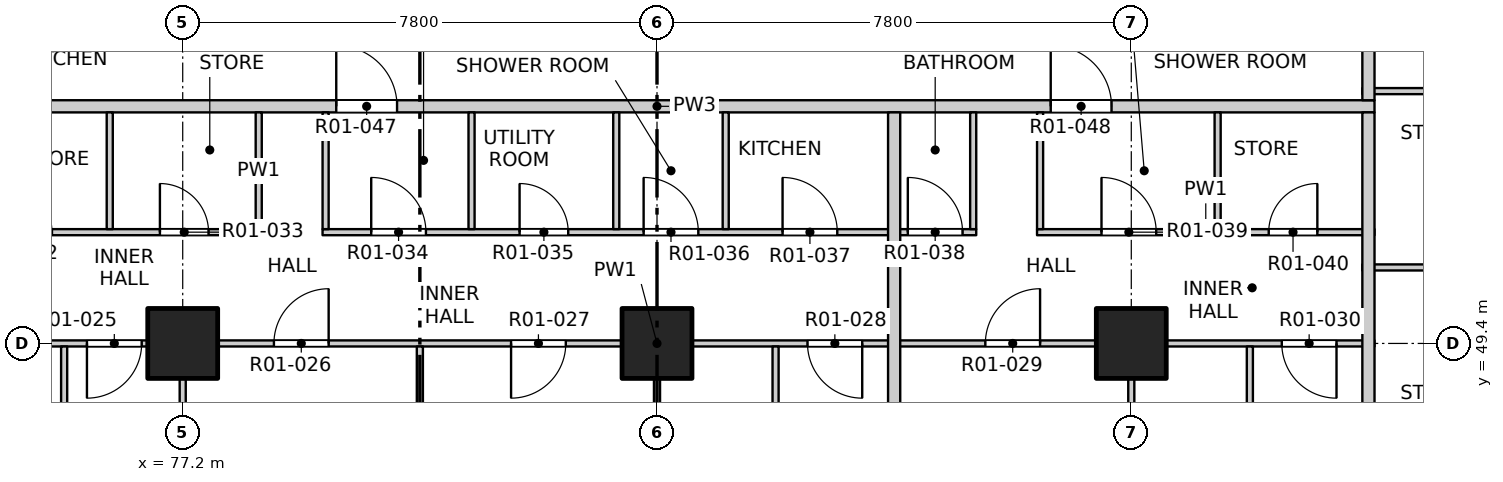
"""IFC4 building model, lengths in metres.
Left out: names, types, materials, properties, quantities, classifications, styles, units other than length and angle.
Written with IfcOpenShell. Run it as: python <this file> out.ifc"""

import sys

from ifc_helpers import new_model, si_unit, direction, frame, frame_2d, origin, origin_2d, place, context, subcontext, project, spatial, rectangle, extrude, element, fill, save


model = new_model("IFC4")
c1 = context("Model", 3, precision=1e-05, world=origin(), true_north=direction((0.0, 1.0)))
c2 = subcontext(c1, "Body", "Model", "MODEL_VIEW")
j1 = project(units=[si_unit("LENGTHUNIT", "METRE"), si_unit("PLANEANGLEUNIT", "RADIAN")], contexts=[c1])
p1 = place(None, origin())
s1 = spatial("IfcSite", under=j1, at=p1, CompositionType="ELEMENT")
p2 = place(p1, origin())
s2 = spatial("IfcBuilding", under=s1, at=p2, CompositionType="ELEMENT")
p3 = place(p2, frame((0.0, 0.0, 26.3)))
s3 = spatial("IfcBuildingStorey", under=s2, at=p3, CompositionType="ELEMENT", Elevation=26.3)
for number, where, z_axis, x_axis in (
    (1, (77.2, 49.4, -0.25), (0.0, 0.0, 1.0), (1.0, 0.0, 0.0)),
    (2, (85.0, 49.4, -0.25), (0.0, 0.0, 1.0), (1.0, 0.0, 0.0)),
    (3, (92.8, 49.4, -0.25), (0.0, 0.0, 1.0), (1.0, 0.0, 0.0)),
):
    element("IfcColumn", number, at=place(p3, frame(where, z_axis=z_axis, x_axis=x_axis)), inside=s3, PredefinedType="COLUMN", context=c2, shape_type="SweptSolid", body=[
        extrude(rectangle(XDim=1.15, YDim=1.15, at=origin_2d()), origin(), (0.0, 0.0, 1.0), 3.4),
    ])
p4 = place(p3, frame((73.2, 49.4, 0.0), z_axis=(0.0, 0.0, 1.0), x_axis=(1.0, 0.0, 0.0)))
e4 = element("IfcWall", 4, at=p4, inside=s3, PredefinedType="PARTITIONING", context=c2, shape_type="SweptSolid", body=[
    extrude(rectangle(XDim=23.6, YDim=0.1, at=frame_2d((11.8, 0.0))), origin(), (0.0, 0.0, 1.0), 3.15),
])
p5 = place(p4, frame((2.425, 0.0, 0.0)))
e5 = element("IfcOpeningElement", 5, at=p5, cuts=e4, PredefinedType="OPENING", context=c2, shape_type="SweptSolid", body=[
    extrude(rectangle(XDim=0.9, YDim=2.1, at=frame_2d((0.45, 1.05))), frame((0.0, 0.06, 0.0), z_axis=(0.0, -1.0, 0.0), x_axis=(1.0, 0.0, 0.0)), (0.0, 0.0, 1.0), 0.12),
])
p6 = place(p4, frame((5.5, 0.0, 0.0)))
e6 = element("IfcOpeningElement", 6, at=p6, cuts=e4, PredefinedType="OPENING", context=c2, shape_type="SweptSolid", body=[
    extrude(rectangle(XDim=0.9, YDim=2.1, at=frame_2d((0.45, 1.05))), frame((0.0, 0.06, 0.0), z_axis=(0.0, -1.0, 0.0), x_axis=(1.0, 0.0, 0.0)), (0.0, 0.0, 1.0), 0.12),
])
p7 = place(p4, frame((9.4, 0.0, 0.0)))
e7 = element("IfcOpeningElement", 7, at=p7, cuts=e4, PredefinedType="OPENING", context=c2, shape_type="SweptSolid", body=[
    extrude(rectangle(XDim=0.9, YDim=2.1, at=frame_2d((0.45, 1.05))), frame((0.0, 0.06, 0.0), z_axis=(0.0, -1.0, 0.0), x_axis=(1.0, 0.0, 0.0)), (0.0, 0.0, 1.0), 0.12),
])
p8 = place(p4, frame((14.275, 0.0, 0.0)))
e8 = element("IfcOpeningElement", 8, at=p8, cuts=e4, PredefinedType="OPENING", context=c2, shape_type="SweptSolid", body=[
    extrude(rectangle(XDim=0.9, YDim=2.1, at=frame_2d((0.45, 1.05))), frame((0.0, 0.06, 0.0), z_axis=(0.0, -1.0, 0.0), x_axis=(1.0, 0.0, 0.0)), (0.0, 0.0, 1.0), 0.12),
])
p9 = place(p4, frame((17.2, 0.0, 0.0)))
e9 = element("IfcOpeningElement", 9, at=p9, cuts=e4, PredefinedType="OPENING", context=c2, shape_type="SweptSolid", body=[
    extrude(rectangle(XDim=0.9, YDim=2.1, at=frame_2d((0.45, 1.05))), frame((0.0, 0.06, 0.0), z_axis=(0.0, -1.0, 0.0), x_axis=(1.0, 0.0, 0.0)), (0.0, 0.0, 1.0), 0.12),
])
p10 = place(p4, frame((22.075, 0.0, 0.0)))
e10 = element("IfcOpeningElement", 10, at=p10, cuts=e4, PredefinedType="OPENING", context=c2, shape_type="SweptSolid", body=[
    extrude(rectangle(XDim=0.9, YDim=2.1, at=frame_2d((0.45, 1.05))), frame((0.0, 0.06, 0.0), z_axis=(0.0, -1.0, 0.0), x_axis=(1.0, 0.0, 0.0)), (0.0, 0.0, 1.0), 0.12),
])
p11 = place(p3, frame((96.6, 50.65, 0.0), z_axis=(0.0, 0.0, 1.0), x_axis=(1.0, 0.0, 0.0)))
e11 = element("IfcWall", 11, at=p11, inside=s3, PredefinedType="PARTITIONING", context=c2, shape_type="SweptSolid", body=[
    extrude(rectangle(XDim=2.22, YDim=0.1, at=frame_2d((1.11, 0.0))), origin(), (0.0, 0.0, 1.0), 3.15),
])
p12 = place(p3, frame((73.2, 51.23, 0.0), z_axis=(0.0, 0.0, 1.0), x_axis=(1.0, 0.0, 0.0)))
e12 = element("IfcWall", 12, at=p12, inside=s3, PredefinedType="PARTITIONING", context=c2, shape_type="SweptSolid", body=[
    extrude(rectangle(XDim=5.3, YDim=0.1, at=frame_2d((2.65, 0.0))), origin(), (0.0, 0.0, 1.0), 3.15),
])
p13 = place(p12, frame((1.05, 0.0, 0.0)))
e13 = element("IfcOpeningElement", 13, at=p13, cuts=e12, PredefinedType="OPENING", context=c2, shape_type="SweptSolid", body=[
    extrude(rectangle(XDim=0.8, YDim=2.1, at=frame_2d((0.4, 1.05))), frame((0.0, 0.06, 0.0), z_axis=(0.0, -1.0, 0.0), x_axis=(1.0, 0.0, 0.0)), (0.0, 0.0, 1.0), 0.12),
])
p14 = place(p12, frame((3.625, 0.0, 0.0)))
e14 = element("IfcOpeningElement", 14, at=p14, cuts=e12, PredefinedType="OPENING", context=c2, shape_type="SweptSolid", body=[
    extrude(rectangle(XDim=0.8, YDim=2.1, at=frame_2d((0.4, 1.05))), frame((0.0, 0.06, 0.0), z_axis=(0.0, -1.0, 0.0), x_axis=(1.0, 0.0, 0.0)), (0.0, 0.0, 1.0), 0.12),
])
p15 = place(p3, frame((79.5, 51.23, 0.0), z_axis=(0.0, 0.0, 1.0), x_axis=(1.0, 0.0, 0.0)))
e15 = element("IfcWall", 15, at=p15, inside=s3, PredefinedType="PARTITIONING", context=c2, shape_type="SweptSolid", body=[
    extrude(rectangle(XDim=10.75, YDim=0.1, at=frame_2d((5.375, 0.0))), origin(), (0.0, 0.0, 1.0), 3.15),
])
p16 = place(p15, frame((0.8, 0.0, 0.0)))
e16 = element("IfcOpeningElement", 16, at=p16, cuts=e15, PredefinedType="OPENING", context=c2, shape_type="SweptSolid", body=[
    extrude(rectangle(XDim=0.9, YDim=2.1, at=frame_2d((0.45, 1.05))), frame((0.0, 0.06, 0.0), z_axis=(0.0, -1.0, 0.0), x_axis=(1.0, 0.0, 0.0)), (0.0, 0.0, 1.0), 0.12),
])
p17 = place(p15, frame((3.24, 0.0, 0.0)))
e17 = element("IfcOpeningElement", 17, at=p17, cuts=e15, PredefinedType="OPENING", context=c2, shape_type="SweptSolid", body=[
    extrude(rectangle(XDim=0.8, YDim=2.1, at=frame_2d((0.4, 1.05))), frame((0.0, 0.06, 0.0), z_axis=(0.0, -1.0, 0.0), x_axis=(1.0, 0.0, 0.0)), (0.0, 0.0, 1.0), 0.12),
])
p18 = place(p15, frame((5.28, 0.0, 0.0)))
e18 = element("IfcOpeningElement", 18, at=p18, cuts=e15, PredefinedType="OPENING", context=c2, shape_type="SweptSolid", body=[
    extrude(rectangle(XDim=0.9, YDim=2.1, at=frame_2d((0.45, 1.05))), frame((0.0, 0.06, 0.0), z_axis=(0.0, -1.0, 0.0), x_axis=(1.0, 0.0, 0.0)), (0.0, 0.0, 1.0), 0.12),
])
p19 = place(p15, frame((7.565, 0.0, 0.0)))
e19 = element("IfcOpeningElement", 19, at=p19, cuts=e15, PredefinedType="OPENING", context=c2, shape_type="SweptSolid", body=[
    extrude(rectangle(XDim=0.9, YDim=2.1, at=frame_2d((0.45, 1.05))), frame((0.0, 0.06, 0.0), z_axis=(0.0, -1.0, 0.0), x_axis=(1.0, 0.0, 0.0)), (0.0, 0.0, 1.0), 0.12),
])
p20 = place(p15, frame((9.625, 0.0, 0.0)))
e20 = element("IfcOpeningElement", 20, at=p20, cuts=e15, PredefinedType="OPENING", context=c2, shape_type="SweptSolid", body=[
    extrude(rectangle(XDim=0.9, YDim=2.1, at=frame_2d((0.45, 1.05))), frame((0.0, 0.06, 0.0), z_axis=(0.0, -1.0, 0.0), x_axis=(1.0, 0.0, 0.0)), (0.0, 0.0, 1.0), 0.12),
])
p21 = place(p3, frame((91.25, 51.23, 0.0), z_axis=(0.0, 0.0, 1.0), x_axis=(1.0, 0.0, 0.0)))
e21 = element("IfcWall", 21, at=p21, inside=s3, PredefinedType="PARTITIONING", context=c2, shape_type="SweptSolid", body=[
    extrude(rectangle(XDim=5.55, YDim=0.1, at=frame_2d((2.775, 0.0))), origin(), (0.0, 0.0, 1.0), 3.15),
])
p22 = place(p21, frame((1.06, 0.0, 0.0)))
e22 = element("IfcOpeningElement", 22, at=p22, cuts=e21, PredefinedType="OPENING", context=c2, shape_type="SweptSolid", body=[
    extrude(rectangle(XDim=0.9, YDim=2.1, at=frame_2d((0.45, 1.05))), frame((0.0, 0.06, 0.0), z_axis=(0.0, -1.0, 0.0), x_axis=(1.0, 0.0, 0.0)), (0.0, 0.0, 1.0), 0.12),
])
p23 = place(p21, frame((3.81, 0.0, 0.0)))
e23 = element("IfcOpeningElement", 23, at=p23, cuts=e21, PredefinedType="OPENING", context=c2, shape_type="SweptSolid", body=[
    extrude(rectangle(XDim=0.8, YDim=2.1, at=frame_2d((0.4, 1.05))), frame((0.0, 0.06, 0.0), z_axis=(0.0, -1.0, 0.0), x_axis=(1.0, 0.0, 0.0)), (0.0, 0.0, 1.0), 0.12),
])
p24 = place(p3, frame((73.2, 53.3, 0.0), z_axis=(0.0, 0.0, 1.0), x_axis=(1.0, 0.0, 0.0)))
e24 = element("IfcWall", 24, at=p24, inside=s3, PredefinedType="PARTITIONING", context=c2, shape_type="SweptSolid", body=[
    extrude(rectangle(XDim=23.6, YDim=0.2, at=frame_2d((11.8, 0.0))), origin(), (0.0, 0.0, 1.0), 3.15),
])
p25 = place(p24, frame((6.525, 0.0, 0.0)))
e25 = element("IfcOpeningElement", 25, at=p25, cuts=e24, PredefinedType="OPENING", context=c2, shape_type="SweptSolid", body=[
    extrude(rectangle(XDim=1.0, YDim=2.1, at=frame_2d((0.5, 1.05))), frame((0.0, 0.11, 0.0), z_axis=(0.0, -1.0, 0.0), x_axis=(1.0, 0.0, 0.0)), (0.0, 0.0, 1.0), 0.22),
])
p26 = place(p24, frame((18.275, 0.0, 0.0)))
e26 = element("IfcOpeningElement", 26, at=p26, cuts=e24, PredefinedType="OPENING", context=c2, shape_type="SweptSolid", body=[
    extrude(rectangle(XDim=1.0, YDim=2.1, at=frame_2d((0.5, 1.05))), frame((0.0, 0.11, 0.0), z_axis=(0.0, -1.0, 0.0), x_axis=(1.0, 0.0, 0.0)), (0.0, 0.0, 1.0), 0.22),
])
p27 = place(p3, frame((96.6, 53.55, 0.0), z_axis=(0.0, 0.0, 1.0), x_axis=(1.0, 0.0, 0.0)))
e27 = element("IfcWall", 27, at=p27, inside=s3, PredefinedType="PARTITIONING", context=c2, shape_type="SweptSolid", body=[
    extrude(rectangle(XDim=2.22, YDim=0.1, at=frame_2d((1.11, 0.0))), origin(), (0.0, 0.0, 1.0), 3.15),
])
p28 = place(p3, frame((75.25, 46.0, 0.0), z_axis=(0.0, 0.0, 1.0), x_axis=(0.0, 1.0, 0.0)))
e28 = element("IfcWall", 28, at=p28, inside=s3, PredefinedType="PARTITIONING", context=c2, shape_type="SweptSolid", body=[
    extrude(rectangle(XDim=3.35, YDim=0.1, at=frame_2d((1.675, 0.0))), origin(), (0.0, 0.0, 1.0), 3.15),
])
p29 = place(p3, frame((76.0, 51.28, 0.0), z_axis=(0.0, 0.0, 1.0), x_axis=(0.0, 1.0, 0.0)))
e29 = element("IfcWall", 29, at=p29, inside=s3, PredefinedType="PARTITIONING", context=c2, shape_type="SweptSolid", body=[
    extrude(rectangle(XDim=1.92, YDim=0.1, at=frame_2d((0.96, 0.0))), origin(), (0.0, 0.0, 1.0), 3.15),
])
p30 = place(p3, frame((77.2, 41.9, 0.0), z_axis=(0.0, 0.0, 1.0), x_axis=(0.0, 1.0, 0.0)))
e30 = element("IfcWall", 30, at=p30, inside=s3, PredefinedType="PARTITIONING", context=c2, shape_type="SweptSolid", body=[
    extrude(rectangle(XDim=7.45, YDim=0.1, at=frame_2d((3.725, 0.0))), origin(), (0.0, 0.0, 1.0), 2.55),
])
for number, where, z_axis, x_axis in (
    (31, (78.45, 51.28, 0.0), (0.0, 0.0, 1.0), (0.0, 1.0, 0.0)),
    (32, (79.55, 51.28, 0.0), (0.0, 0.0, 1.0), (0.0, 1.0, 0.0)),
):
    element("IfcWall", number, at=place(p3, frame(where, z_axis=z_axis, x_axis=x_axis)), inside=s3, PredefinedType="PARTITIONING", context=c2, shape_type="SweptSolid", body=[
        extrude(rectangle(XDim=1.92, YDim=0.1, at=frame_2d((0.96, 0.0))), origin(), (0.0, 0.0, 1.0), 3.15),
    ])
p31 = place(p3, frame((81.1, 41.9, 0.0), z_axis=(0.0, 0.0, 1.0), x_axis=(0.0, 1.0, 0.0)))
e33 = element("IfcWall", 33, at=p31, inside=s3, PredefinedType="PARTITIONING", context=c2, shape_type="SweptSolid", body=[
    extrude(rectangle(XDim=7.45, YDim=0.1, at=frame_2d((3.725, 0.0))), origin(), (0.0, 0.0, 1.0), 3.15),
])
for number, where, z_axis, x_axis in (
    (34, (81.95, 51.28, 0.0), (0.0, 0.0, 1.0), (0.0, 1.0, 0.0)),
    (35, (84.33, 51.28, 0.0), (0.0, 0.0, 1.0), (0.0, 1.0, 0.0)),
):
    element("IfcWall", number, at=place(p3, frame(where, z_axis=z_axis, x_axis=x_axis)), inside=s3, PredefinedType="PARTITIONING", context=c2, shape_type="SweptSolid", body=[
        extrude(rectangle(XDim=1.92, YDim=0.1, at=frame_2d((0.96, 0.0))), origin(), (0.0, 0.0, 1.0), 3.15),
    ])
p32 = place(p3, frame((85.0, 41.9, 0.0), z_axis=(0.0, 0.0, 1.0), x_axis=(0.0, 1.0, 0.0)))
e36 = element("IfcWall", 36, at=p32, inside=s3, PredefinedType="PARTITIONING", context=c2, shape_type="SweptSolid", body=[
    extrude(rectangle(XDim=7.45, YDim=0.1, at=frame_2d((3.725, 0.0))), origin(), (0.0, 0.0, 1.0), 2.55),
])
p33 = place(p3, frame((86.13, 51.28, 0.0), z_axis=(0.0, 0.0, 1.0), x_axis=(0.0, 1.0, 0.0)))
e37 = element("IfcWall", 37, at=p33, inside=s3, PredefinedType="PARTITIONING", context=c2, shape_type="SweptSolid", body=[
    extrude(rectangle(XDim=1.92, YDim=0.1, at=frame_2d((0.96, 0.0))), origin(), (0.0, 0.0, 1.0), 3.15),
])
p34 = place(p3, frame((86.95, 46.0, 0.0), z_axis=(0.0, 0.0, 1.0), x_axis=(0.0, 1.0, 0.0)))
e38 = element("IfcWall", 38, at=p34, inside=s3, PredefinedType="PARTITIONING", context=c2, shape_type="SweptSolid", body=[
    extrude(rectangle(XDim=3.35, YDim=0.1, at=frame_2d((1.675, 0.0))), origin(), (0.0, 0.0, 1.0), 3.15),
])
p35 = place(p3, frame((88.9, 41.9, 0.0), z_axis=(0.0, 0.0, 1.0), x_axis=(0.0, 1.0, 0.0)))
e39 = element("IfcWall", 39, at=p35, inside=s3, PredefinedType="PARTITIONING", context=c2, shape_type="SweptSolid", body=[
    extrude(rectangle(XDim=11.3, YDim=0.2, at=frame_2d((5.65, 0.0))), origin(), (0.0, 0.0, 1.0), 3.15),
])
for number, where, z_axis, x_axis in (
    (40, (90.2, 51.28, 0.0), (0.0, 0.0, 1.0), (0.0, 1.0, 0.0)),
    (41, (91.3, 51.28, 0.0), (0.0, 0.0, 1.0), (0.0, 1.0, 0.0)),
):
    element("IfcWall", number, at=place(p3, frame(where, z_axis=z_axis, x_axis=x_axis)), inside=s3, PredefinedType="PARTITIONING", context=c2, shape_type="SweptSolid", body=[
        extrude(rectangle(XDim=1.92, YDim=0.1, at=frame_2d((0.96, 0.0))), origin(), (0.0, 0.0, 1.0), 3.15),
    ])
p36 = place(p3, frame((92.8, 41.9, 0.0), z_axis=(0.0, 0.0, 1.0), x_axis=(0.0, 1.0, 0.0)))
e42 = element("IfcWall", 42, at=p36, inside=s3, PredefinedType="PARTITIONING", context=c2, shape_type="SweptSolid", body=[
    extrude(rectangle(XDim=7.45, YDim=0.1, at=frame_2d((3.725, 0.0))), origin(), (0.0, 0.0, 1.0), 2.55),
])
p37 = place(p3, frame((94.22, 51.28, 0.0), z_axis=(0.0, 0.0, 1.0), x_axis=(0.0, 1.0, 0.0)))
e43 = element("IfcWall", 43, at=p37, inside=s3, PredefinedType="PARTITIONING", context=c2, shape_type="SweptSolid", body=[
    extrude(rectangle(XDim=1.92, YDim=0.1, at=frame_2d((0.96, 0.0))), origin(), (0.0, 0.0, 1.0), 3.15),
])
p38 = place(p3, frame((94.75, 45.85, 0.0), z_axis=(0.0, 0.0, 1.0), x_axis=(0.0, 1.0, 0.0)))
e44 = element("IfcWall", 44, at=p38, inside=s3, PredefinedType="PARTITIONING", context=c2, shape_type="SweptSolid", body=[
    extrude(rectangle(XDim=3.5, YDim=0.1, at=frame_2d((1.75, 0.0))), origin(), (0.0, 0.0, 1.0), 3.15),
])
p39 = place(p3, frame((96.7, 41.9, 0.0), z_axis=(0.0, 0.0, 1.0), x_axis=(0.0, 1.0, 0.0)))
e45 = element("IfcWall", 45, at=p39, inside=s3, PredefinedType="PARTITIONING", context=c2, shape_type="SweptSolid", body=[
    extrude(rectangle(XDim=11.3, YDim=0.2, at=frame_2d((5.65, 0.0))), origin(), (0.0, 0.0, 1.0), 3.15),
])
p40 = place(p3, frame((96.7, 53.4, 0.0), z_axis=(0.0, 0.0, 1.0), x_axis=(0.0, 1.0, 0.0)))
e46 = element("IfcWall", 46, at=p40, inside=s3, PredefinedType="PARTITIONING", context=c2, shape_type="SweptSolid", body=[
    extrude(rectangle(XDim=31.0, YDim=0.2, at=frame_2d((15.5, 0.0))), origin(), (0.0, 0.0, 1.0), 3.15),
])
p41 = place(p40, frame((5.575, 0.0, 0.0)))
e47 = element("IfcOpeningElement", 47, at=p41, cuts=e46, PredefinedType="OPENING", context=c2, shape_type="SweptSolid", body=[
    extrude(rectangle(XDim=1.0, YDim=2.1, at=frame_2d((0.5, 1.05))), frame((0.0, 0.11, 0.0), z_axis=(0.0, -1.0, 0.0), x_axis=(1.0, 0.0, 0.0)), (0.0, 0.0, 1.0), 0.22),
])
p42 = place(p40, frame((10.075, 0.0, 0.0)))
e48 = element("IfcOpeningElement", 48, at=p42, cuts=e46, PredefinedType="OPENING", context=c2, shape_type="SweptSolid", body=[
    extrude(rectangle(XDim=1.0, YDim=2.1, at=frame_2d((0.5, 1.05))), frame((0.0, 0.11, 0.0), z_axis=(0.0, -1.0, 0.0), x_axis=(1.0, 0.0, 0.0)), (0.0, 0.0, 1.0), 0.22),
])
p43 = place(p40, frame((28.975, 0.0, 0.0)))
e49 = element("IfcOpeningElement", 49, at=p43, cuts=e46, PredefinedType="OPENING", context=c2, shape_type="SweptSolid", body=[
    extrude(rectangle(XDim=1.0, YDim=2.1, at=frame_2d((0.5, 1.05))), frame((0.0, 0.11, 0.0), z_axis=(0.0, -1.0, 0.0), x_axis=(1.0, 0.0, 0.0)), (0.0, 0.0, 1.0), 0.22),
])
p44 = place(p5, origin())
e50 = element("IfcDoor", 50, at=p44, inside=s3, OperationType="SINGLE_SWING_RIGHT", PredefinedType="DOOR", context=c2, shape_type="SweptSolid", body=[
    extrude(rectangle(XDim=0.9, YDim=2.1, at=frame_2d((0.45, 1.05))), frame((0.0, 0.025, 0.0), z_axis=(0.0, -1.0, 0.0), x_axis=(1.0, 0.0, 0.0)), (0.0, 0.0, 1.0), 0.05),
])
fill(e5, e50)
p45 = place(p6, origin())
e51 = element("IfcDoor", 51, at=p45, inside=s3, OperationType="SINGLE_SWING_RIGHT", PredefinedType="DOOR", context=c2, shape_type="SweptSolid", body=[
    extrude(rectangle(XDim=0.9, YDim=2.1, at=frame_2d((0.45, 1.05))), frame((0.0, 0.025, 0.0), z_axis=(0.0, -1.0, 0.0), x_axis=(1.0, 0.0, 0.0)), (0.0, 0.0, 1.0), 0.05),
])
fill(e6, e51)
p46 = place(p7, origin())
e52 = element("IfcDoor", 52, at=p46, inside=s3, OperationType="SINGLE_SWING_RIGHT", PredefinedType="DOOR", context=c2, shape_type="SweptSolid", body=[
    extrude(rectangle(XDim=0.9, YDim=2.1, at=frame_2d((0.45, 1.05))), frame((0.0, 0.025, 0.0), z_axis=(0.0, -1.0, 0.0), x_axis=(1.0, 0.0, 0.0)), (0.0, 0.0, 1.0), 0.05),
])
fill(e7, e52)
p47 = place(p8, origin())
e53 = element("IfcDoor", 53, at=p47, inside=s3, OperationType="SINGLE_SWING_LEFT", PredefinedType="DOOR", context=c2, shape_type="SweptSolid", body=[
    extrude(rectangle(XDim=0.9, YDim=2.1, at=frame_2d((0.45, 1.05))), frame((0.0, 0.025, 0.0), z_axis=(0.0, -1.0, 0.0), x_axis=(1.0, 0.0, 0.0)), (0.0, 0.0, 1.0), 0.05),
])
fill(e8, e53)
p48 = place(p9, origin())
e54 = element("IfcDoor", 54, at=p48, inside=s3, OperationType="SINGLE_SWING_RIGHT", PredefinedType="DOOR", context=c2, shape_type="SweptSolid", body=[
    extrude(rectangle(XDim=0.9, YDim=2.1, at=frame_2d((0.45, 1.05))), frame((0.0, 0.025, 0.0), z_axis=(0.0, -1.0, 0.0), x_axis=(1.0, 0.0, 0.0)), (0.0, 0.0, 1.0), 0.05),
])
fill(e9, e54)
p49 = place(p10, origin())
e55 = element("IfcDoor", 55, at=p49, inside=s3, OperationType="SINGLE_SWING_LEFT", PredefinedType="DOOR", context=c2, shape_type="SweptSolid", body=[
    extrude(rectangle(XDim=0.9, YDim=2.1, at=frame_2d((0.45, 1.05))), frame((0.0, 0.025, 0.0), z_axis=(0.0, -1.0, 0.0), x_axis=(1.0, 0.0, 0.0)), (0.0, 0.0, 1.0), 0.05),
])
fill(e10, e55)
p50 = place(p14, origin())
e56 = element("IfcDoor", 56, at=p50, inside=s3, OperationType="SINGLE_SWING_LEFT", PredefinedType="DOOR", context=c2, shape_type="SweptSolid", body=[
    extrude(rectangle(XDim=0.8, YDim=2.1, at=frame_2d((0.4, 1.05))), frame((0.0, 0.025, 0.0), z_axis=(0.0, -1.0, 0.0), x_axis=(1.0, 0.0, 0.0)), (0.0, 0.0, 1.0), 0.05),
])
fill(e14, e56)
p51 = place(p16, origin())
e57 = element("IfcDoor", 57, at=p51, inside=s3, OperationType="SINGLE_SWING_LEFT", PredefinedType="DOOR", context=c2, shape_type="SweptSolid", body=[
    extrude(rectangle(XDim=0.9, YDim=2.1, at=frame_2d((0.45, 1.05))), frame((0.0, 0.025, 0.0), z_axis=(0.0, -1.0, 0.0), x_axis=(1.0, 0.0, 0.0)), (0.0, 0.0, 1.0), 0.05),
])
fill(e16, e57)
p52 = place(p17, origin())
e58 = element("IfcDoor", 58, at=p52, inside=s3, OperationType="SINGLE_SWING_LEFT", PredefinedType="DOOR", context=c2, shape_type="SweptSolid", body=[
    extrude(rectangle(XDim=0.8, YDim=2.1, at=frame_2d((0.4, 1.05))), frame((0.0, 0.025, 0.0), z_axis=(0.0, -1.0, 0.0), x_axis=(1.0, 0.0, 0.0)), (0.0, 0.0, 1.0), 0.05),
])
fill(e17, e58)
p53 = place(p18, origin())
e59 = element("IfcDoor", 59, at=p53, inside=s3, OperationType="SINGLE_SWING_LEFT", PredefinedType="DOOR", context=c2, shape_type="SweptSolid", body=[
    extrude(rectangle(XDim=0.9, YDim=2.1, at=frame_2d((0.45, 1.05))), frame((0.0, 0.025, 0.0), z_axis=(0.0, -1.0, 0.0), x_axis=(1.0, 0.0, 0.0)), (0.0, 0.0, 1.0), 0.05),
])
fill(e18, e59)
p54 = place(p19, origin())
e60 = element("IfcDoor", 60, at=p54, inside=s3, OperationType="SINGLE_SWING_LEFT", PredefinedType="DOOR", context=c2, shape_type="SweptSolid", body=[
    extrude(rectangle(XDim=0.9, YDim=2.1, at=frame_2d((0.45, 1.05))), frame((0.0, 0.025, 0.0), z_axis=(0.0, -1.0, 0.0), x_axis=(1.0, 0.0, 0.0)), (0.0, 0.0, 1.0), 0.05),
])
fill(e19, e60)
p55 = place(p20, origin())
e61 = element("IfcDoor", 61, at=p55, inside=s3, OperationType="SINGLE_SWING_LEFT", PredefinedType="DOOR", context=c2, shape_type="SweptSolid", body=[
    extrude(rectangle(XDim=0.9, YDim=2.1, at=frame_2d((0.45, 1.05))), frame((0.0, 0.025, 0.0), z_axis=(0.0, -1.0, 0.0), x_axis=(1.0, 0.0, 0.0)), (0.0, 0.0, 1.0), 0.05),
])
fill(e20, e61)
p56 = place(p22, origin())
e62 = element("IfcDoor", 62, at=p56, inside=s3, OperationType="SINGLE_SWING_LEFT", PredefinedType="DOOR", context=c2, shape_type="SweptSolid", body=[
    extrude(rectangle(XDim=0.9, YDim=2.1, at=frame_2d((0.45, 1.05))), frame((0.0, 0.025, 0.0), z_axis=(0.0, -1.0, 0.0), x_axis=(1.0, 0.0, 0.0)), (0.0, 0.0, 1.0), 0.05),
])
fill(e22, e62)
p57 = place(p23, origin())
e63 = element("IfcDoor", 63, at=p57, inside=s3, OperationType="SINGLE_SWING_RIGHT", PredefinedType="DOOR", context=c2, shape_type="SweptSolid", body=[
    extrude(rectangle(XDim=0.8, YDim=2.1, at=frame_2d((0.4, 1.05))), frame((0.0, 0.025, 0.0), z_axis=(0.0, -1.0, 0.0), x_axis=(1.0, 0.0, 0.0)), (0.0, 0.0, 1.0), 0.05),
])
fill(e23, e63)
p58 = place(p25, origin())
e64 = element("IfcDoor", 64, at=p58, inside=s3, OperationType="SINGLE_SWING_LEFT", PredefinedType="DOOR", context=c2, shape_type="SweptSolid", body=[
    extrude(rectangle(XDim=1.0, YDim=2.1, at=frame_2d((0.5, 1.05))), frame((0.0, 0.025, 0.0), z_axis=(0.0, -1.0, 0.0), x_axis=(1.0, 0.0, 0.0)), (0.0, 0.0, 1.0), 0.05),
])
fill(e25, e64)
p59 = place(p26, origin())
e65 = element("IfcDoor", 65, at=p59, inside=s3, OperationType="SINGLE_SWING_LEFT", PredefinedType="DOOR", context=c2, shape_type="SweptSolid", body=[
    extrude(rectangle(XDim=1.0, YDim=2.1, at=frame_2d((0.5, 1.05))), frame((0.0, 0.025, 0.0), z_axis=(0.0, -1.0, 0.0), x_axis=(1.0, 0.0, 0.0)), (0.0, 0.0, 1.0), 0.05),
])
fill(e26, e65)
save(model, sys.argv[1])
